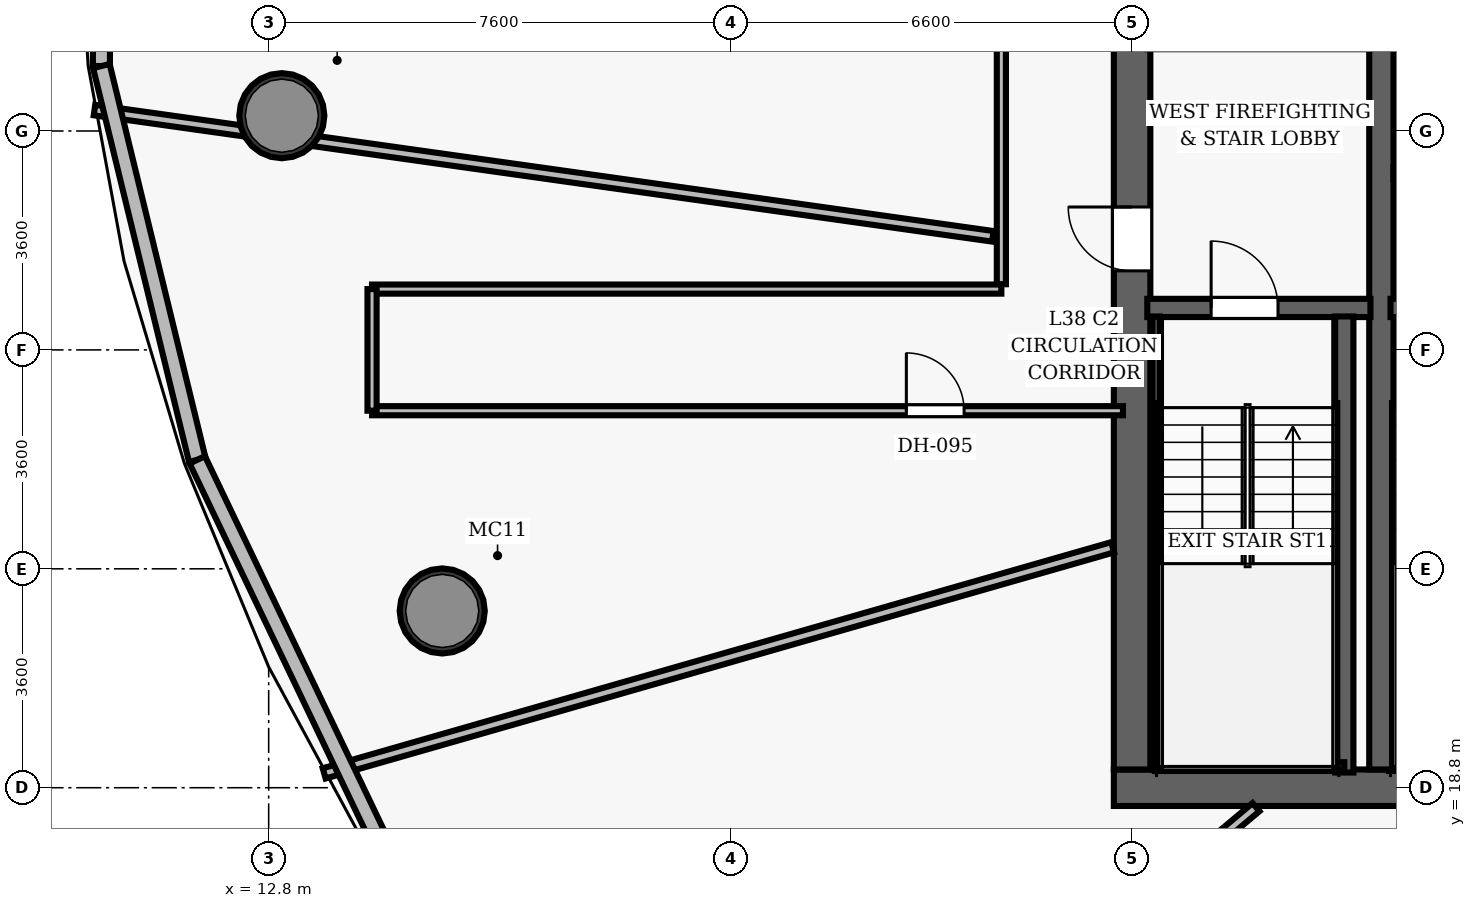
"""IFC4 building model, lengths in metres.
Left out: names, types, materials, properties, quantities, classifications, styles, units other than length and angle.
Written with IfcOpenShell. Run it as: python <this file> out.ifc"""

import sys

from ifc_helpers import new_model, si_unit, direction, frame, frame_2d, origin, origin_2d, place, context, subcontext, project, spatial, rectangle, hollow_circle, extrude, element, fill, save


model = new_model("IFC4")
c1 = context("Model", 3, precision=1e-05, world=origin(), true_north=direction((0.0, 1.0)))
c2 = subcontext(c1, "Body", "Model", "MODEL_VIEW")
j1 = project(units=[si_unit("LENGTHUNIT", "METRE"), si_unit("PLANEANGLEUNIT", "RADIAN")], contexts=[c1])
p1 = place(None, origin())
s1 = spatial("IfcSite", under=j1, at=p1, CompositionType="ELEMENT")
p2 = place(p1, origin())
s2 = spatial("IfcBuilding", under=s1, at=p2, CompositionType="ELEMENT")
p3 = place(p2, frame((0.0, 0.0, 151.8)))
s3 = spatial("IfcBuildingStorey", under=s2, at=p3, CompositionType="ELEMENT", Elevation=151.8)
p4 = place(p3, frame((26.7, 18.8, 0.0), z_axis=(0.0, 0.0, 1.0), x_axis=(1.0, 0.0, 0.0)))
e1 = element("IfcWall", 1, at=p4, inside=s3, PredefinedType="SHEAR", context=c2, shape_type="SweptSolid", body=[
    extrude(rectangle(XDim=22.6, YDim=0.6, at=frame_2d((11.3, 0.0))), origin(), (0.0, 0.0, 1.0), 3.5),
])
p5 = place(p4, frame((14.52, 0.0, 0.0)))
e2 = element("IfcOpeningElement", 2, at=p5, cuts=e1, PredefinedType="OPENING", context=c2, shape_type="SweptSolid", body=[
    extrude(rectangle(XDim=1.05, YDim=2.15, at=frame_2d((0.525, 1.075))), frame((0.0, 0.31, 0.0), z_axis=(0.0, -1.0, 0.0), x_axis=(1.0, 0.0, 0.0)), (0.0, 0.0, 1.0), 0.62),
])
p6 = place(p3, frame((27.0, 19.1, 0.0), z_axis=(0.0, 0.0, 1.0), x_axis=(0.0, 1.0, 0.0)))
e3 = element("IfcWall", 3, at=p6, inside=s3, PredefinedType="SHEAR", context=c2, shape_type="SweptSolid", body=[
    extrude(rectangle(XDim=13.8, YDim=0.6, at=frame_2d((6.9, 0.0))), origin(), (0.0, 0.0, 1.0), 3.5),
])
p7 = place(p6, frame((8.2, 0.0, 0.0)))
e4 = element("IfcOpeningElement", 4, at=p7, cuts=e3, PredefinedType="OPENING", context=c2, shape_type="SweptSolid", body=[
    extrude(rectangle(XDim=1.05, YDim=2.15, at=frame_2d((0.525, 1.075))), frame((0.0, 0.31, 0.0), z_axis=(0.0, -1.0, 0.0), x_axis=(1.0, 0.0, 0.0)), (0.0, 0.0, 1.0), 0.62),
])
p8 = place(p3, frame((31.1, 19.1, 0.0), z_axis=(0.0, 0.0, 1.0), x_axis=(0.0, 1.0, 0.0)))
e5 = element("IfcWall", 5, at=p8, inside=s3, PredefinedType="SHEAR", context=c2, shape_type="SweptSolid", body=[
    extrude(rectangle(XDim=13.8, YDim=0.4, at=frame_2d((6.9, 0.0))), origin(), (0.0, 0.0, 1.0), 3.5),
])
for number, where, z_axis, x_axis in (
    (6, (13.016, 29.852, 0.0), (0.0, 0.0, 1.0), (1.0, 0.0, 0.0)),
    (7, (15.654, 21.707, 0.0), (0.0, 0.0, 1.0), (1.0, 0.0, 0.0)),
):
    element("IfcColumn", number, at=place(p3, frame(where, z_axis=z_axis, x_axis=x_axis)), inside=s3, PredefinedType="COLUMN", context=c2, shape_type="SweptSolid", body=[
        extrude(hollow_circle(Radius=0.7, WallThickness=0.055, at=origin_2d()), origin(), (0.0, 0.0, 1.0), 3.5),
    ])
p9 = place(p3, frame((27.25, 26.69, 0.0), z_axis=(0.0, 0.0, 1.0), x_axis=(1.0, 0.0, 0.0)))
e8 = element("IfcWall", 8, at=p9, inside=s3, PredefinedType="SHEAR", context=c2, shape_type="SweptSolid", body=[
    extrude(rectangle(XDim=3.67, YDim=0.3, at=frame_2d((1.835, 0.0))), origin(), (0.0, 0.0, 1.0), 3.5),
])
p10 = place(p9, frame((1.05, 0.0, 0.0)))
e9 = element("IfcOpeningElement", 9, at=p10, cuts=e8, PredefinedType="OPENING", context=c2, shape_type="SweptSolid", body=[
    extrude(rectangle(XDim=1.1, YDim=2.15, at=frame_2d((0.55, 1.075))), frame((0.0, 0.16, 0.0), z_axis=(0.0, -1.0, 0.0), x_axis=(1.0, 0.0, 0.0)), (0.0, 0.0, 1.0), 0.32),
])
p11 = place(p3, frame((30.49, 19.05, 0.0), z_axis=(0.0, 0.0, 1.0), x_axis=(0.0, 1.0, 0.0)))
e10 = element("IfcWall", 10, at=p11, inside=s3, PredefinedType="SHEAR", context=c2, shape_type="SweptSolid", body=[
    extrude(rectangle(XDim=7.5, YDim=0.3, at=frame_2d((3.75, 0.0))), origin(), (0.0, 0.0, 1.0), 3.5),
])
p12 = place(p3, frame((27.395, 19.1, 0.0), z_axis=(0.0, 0.0, 1.0), x_axis=(0.0, 1.0, 0.0)))
e11 = element("IfcWall", 11, at=p12, inside=s3, PredefinedType="SHEAR", context=c2, shape_type="SweptSolid", body=[
    extrude(rectangle(XDim=7.45, YDim=0.12, at=frame_2d((3.725, 0.0))), origin(), (0.0, 0.0, 1.0), 3.5),
])
p13 = place(p3, frame((27.395, 19.16, 0.0), z_axis=(0.0, 0.0, 1.0), x_axis=(1.0, 0.0, 0.0)))
e12 = element("IfcWall", 12, at=p13, inside=s3, PredefinedType="SHEAR", context=c2, shape_type="SweptSolid", body=[
    extrude(rectangle(XDim=3.095, YDim=0.12, at=frame_2d((1.547, 0.0))), origin(), (0.0, 0.0, 1.0), 3.5),
])
p14 = place(p3, frame((31.25, 26.69, 0.0), z_axis=(0.0, 0.0, 1.0), x_axis=(1.0, 0.0, 0.0)))
e13 = element("IfcWall", 13, at=p14, inside=s3, PredefinedType="SHEAR", context=c2, shape_type="SweptSolid", body=[
    extrude(rectangle(XDim=3.56, YDim=0.3, at=frame_2d((1.78, 0.0))), origin(), (0.0, 0.0, 1.0), 3.5),
])
p15 = place(p14, frame((1.55, 0.0, 0.0)))
e14 = element("IfcOpeningElement", 14, at=p15, cuts=e13, PredefinedType="OPENING", context=c2, shape_type="SweptSolid", body=[
    extrude(rectangle(XDim=1.1, YDim=2.15, at=frame_2d((0.55, 1.075))), frame((0.0, 0.16, 0.0), z_axis=(0.0, -1.0, 0.0), x_axis=(1.0, 0.0, 0.0)), (0.0, 0.0, 1.0), 0.32),
])
p16 = place(p3, frame((31.3, 19.16, 0.0), z_axis=(0.0, 0.0, 1.0), x_axis=(1.0, 0.0, 0.0)))
e15 = element("IfcWall", 15, at=p16, inside=s3, PredefinedType="SHEAR", context=c2, shape_type="SweptSolid", body=[
    extrude(rectangle(XDim=3.04, YDim=0.12, at=frame_2d((1.52, 0.0))), origin(), (0.0, 0.0, 1.0), 3.5),
])
p17 = place(p3, frame((31.3, 28.9, 0.0), z_axis=(0.0, 0.0, 1.0), x_axis=(1.0, 0.0, 0.0)))
e16 = element("IfcWall", 16, at=p17, inside=s3, PredefinedType="PARTITIONING", context=c2, shape_type="SweptSolid", body=[
    extrude(rectangle(XDim=1.12, YDim=0.2, at=frame_2d((0.56, 0.0))), origin(), (0.0, 0.0, 1.0), 2.675),
])
p18 = place(p3, frame((24.85, 27.08, 0.0), z_axis=(0.0, 0.0, 1.0), x_axis=(0.0, 1.0, 0.0)))
e17 = element("IfcWall", 17, at=p18, inside=s3, PredefinedType="PARTITIONING", context=c2, shape_type="SweptSolid", body=[
    extrude(rectangle(XDim=8.12, YDim=0.15, at=frame_2d((4.06, 0.0))), origin(), (0.0, 0.0, 1.0), 2.675),
])
p19 = place(p18, frame((4.58, 0.0, 0.0)))
e18 = element("IfcOpeningElement", 18, at=p19, cuts=e17, PredefinedType="OPENING", context=c2, shape_type="SweptSolid", body=[
    extrude(rectangle(XDim=0.95, YDim=2.15, at=frame_2d((0.475, 1.075))), frame((0.0, 0.085, 0.0), z_axis=(0.0, -1.0, 0.0), x_axis=(1.0, 0.0, 0.0)), (0.0, 0.0, 1.0), 0.17),
])
p20 = place(p3, frame((14.5, 27.0, 0.0), z_axis=(0.0, 0.0, 1.0), x_axis=(1.0, 0.0, 0.0)))
e19 = element("IfcWall", 19, at=p20, inside=s3, PredefinedType="PARTITIONING", context=c2, shape_type="SweptSolid", body=[
    extrude(rectangle(XDim=10.35, YDim=0.15, at=frame_2d((5.175, 0.0))), origin(), (0.0, 0.0, 1.0), 2.675),
])
p21 = place(p3, frame((14.5, 25.0, 0.0), z_axis=(0.0, 0.0, 1.0), x_axis=(1.0, 0.0, 0.0)))
e20 = element("IfcWall", 20, at=p21, inside=s3, PredefinedType="PARTITIONING", context=c2, shape_type="SweptSolid", body=[
    extrude(rectangle(XDim=12.35, YDim=0.15, at=frame_2d((6.175, 0.0))), origin(), (0.0, 0.0, 1.0), 2.675),
])
p22 = place(p21, frame((8.788, 0.0, 0.0)))
e21 = element("IfcOpeningElement", 21, at=p22, cuts=e20, PredefinedType="OPENING", context=c2, shape_type="SweptSolid", body=[
    extrude(rectangle(XDim=0.95, YDim=2.15, at=frame_2d((0.475, 1.075))), frame((0.0, 0.085, 0.0), z_axis=(0.0, -1.0, 0.0), x_axis=(1.0, 0.0, 0.0)), (0.0, 0.0, 1.0), 0.17),
])
p23 = place(p3, frame((14.5, 25.0, 0.0), z_axis=(0.0, 0.0, 1.0), x_axis=(0.0, 1.0, 0.0)))
e22 = element("IfcWall", 22, at=p23, inside=s3, PredefinedType="PARTITIONING", context=c2, shape_type="SweptSolid", body=[
    extrude(rectangle(XDim=2.0, YDim=0.15, at=frame_2d((1.0, 0.0))), origin(), (0.0, 0.0, 1.0), 2.675),
])
p24 = place(p3, frame((24.71, 27.868, 0.0), z_axis=(0.0, 0.0, 1.0), x_axis=(-0.990268949967, 0.139166830573, 0.0)))
e23 = element("IfcWall", 23, at=p24, inside=s3, PredefinedType="PARTITIONING", context=c2, shape_type="SweptSolid", body=[
    extrude(rectangle(XDim=14.92, YDim=0.175, at=frame_2d((7.46, 0.0))), origin(), (0.0, 0.0, 1.0), 2.675),
])
p25 = place(p3, frame((26.68, 22.754, 0.0), z_axis=(0.0, 0.0, 1.0), x_axis=(-0.961264003177, -0.275629309393, 0.0)))
e24 = element("IfcWall", 24, at=p25, inside=s3, PredefinedType="PARTITIONING", context=c2, shape_type="SweptSolid", body=[
    extrude(rectangle(XDim=13.49, YDim=0.175, at=frame_2d((6.745, 0.0))), origin(), (0.0, 0.0, 1.0), 2.675),
])
p26 = place(p3, frame((29.038, 18.48, 0.0), z_axis=(0.0, 0.0, 1.0), x_axis=(-0.766045276584, -0.642786616401, 0.0)))
e25 = element("IfcWall", 25, at=p26, inside=s3, PredefinedType="PARTITIONING", context=c2, shape_type="SweptSolid", body=[
    extrude(rectangle(XDim=11.878, YDim=0.175, at=frame_2d((5.939, 0.0))), origin(), (0.0, 0.0, 1.0), 2.675),
])
p27 = place(p3, frame((34.332, 18.48, 0.0), z_axis=(0.0, 0.0, 1.0), x_axis=(-0.43836706514, -0.898796037041, 0.0)))
e26 = element("IfcWall", 26, at=p27, inside=s3, PredefinedType="PARTITIONING", context=c2, shape_type="SweptSolid", body=[
    extrude(rectangle(XDim=14.541, YDim=0.175, at=frame_2d((7.271, 0.0))), origin(), (0.0, 0.0, 1.0), 2.675),
])
p28 = place(p3, frame((10.049, 30.668, 0.0), z_axis=(0.0, 0.0, 1.0), x_axis=(0.006205331259, 0.999980746747, 0.0)))
e27 = element("IfcWall", 27, at=p28, inside=s3, PredefinedType="SOLIDWALL", context=c2, shape_type="SweptSolid", body=[
    extrude(rectangle(XDim=5.823, YDim=0.28, at=frame_2d((2.911, 0.0))), origin(), (0.0, 0.0, 1.0), 3.26),
])
p29 = place(p3, frame((11.625, 24.192, 0.0), z_axis=(0.0, 0.0, 1.0), x_axis=(-0.236592723123, 0.971608914824, 0.0)))
e28 = element("IfcWall", 28, at=p29, inside=s3, PredefinedType="SOLIDWALL", context=c2, shape_type="SweptSolid", body=[
    extrude(rectangle(XDim=6.665, YDim=0.28, at=frame_2d((3.333, 0.0))), origin(), (0.0, 0.0, 1.0), 3.26),
])
p30 = place(p3, frame((14.773, 17.615, 0.0), z_axis=(0.0, 0.0, 1.0), x_axis=(-0.431678214031, 0.902027671156, 0.0)))
e29 = element("IfcWall", 29, at=p30, inside=s3, PredefinedType="SOLIDWALL", context=c2, shape_type="SweptSolid", body=[
    extrude(rectangle(XDim=7.292, YDim=0.28, at=frame_2d((3.646, 0.0))), origin(), (0.0, 0.0, 1.0), 3.26),
])
p31 = place(p10, origin())
e30 = element("IfcDoor", 30, at=p31, inside=s3, OperationType="SINGLE_SWING_LEFT", PredefinedType="DOOR", context=c2, shape_type="SweptSolid", body=[
    extrude(rectangle(XDim=1.1, YDim=2.15, at=frame_2d((0.55, 1.075))), frame((0.0, 0.025, 0.0), z_axis=(0.0, -1.0, 0.0), x_axis=(1.0, 0.0, 0.0)), (0.0, 0.0, 1.0), 0.05),
])
fill(e9, e30)
p32 = place(p7, origin())
e31 = element("IfcDoor", 31, at=p32, inside=s3, OperationType="SINGLE_SWING_RIGHT", PredefinedType="DOOR", context=c2, shape_type="SweptSolid", body=[
    extrude(rectangle(XDim=1.05, YDim=2.15, at=frame_2d((0.525, 1.075))), frame((0.0, 0.025, 0.0), z_axis=(0.0, -1.0, 0.0), x_axis=(1.0, 0.0, 0.0)), (0.0, 0.0, 1.0), 0.05),
])
fill(e4, e31)
p33 = place(p22, origin())
e32 = element("IfcDoor", 32, at=p33, inside=s3, OperationType="SINGLE_SWING_LEFT", PredefinedType="DOOR", context=c2, shape_type="SweptSolid", body=[
    extrude(rectangle(XDim=0.95, YDim=2.15, at=frame_2d((0.475, 1.075))), frame((0.0, 0.025, 0.0), z_axis=(0.0, -1.0, 0.0), x_axis=(1.0, 0.0, 0.0)), (0.0, 0.0, 1.0), 0.05),
])
fill(e21, e32)
save(model, sys.argv[1])
